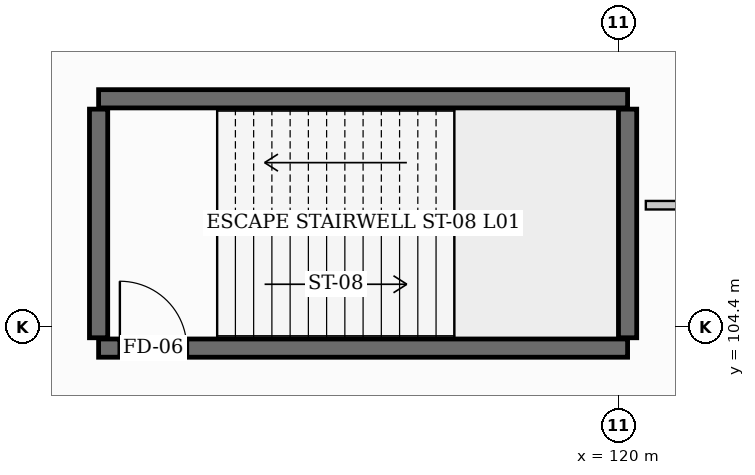
"""IFC4 building model, lengths in metres.
Left out: names, types, materials, properties, quantities, classifications, styles, units other than length and angle.
Written with IfcOpenShell. Run it as: python <this file> out.ifc"""

import sys

from ifc_helpers import new_model, si_unit, direction, frame, frame_2d, origin, place, context, subcontext, project, spatial, rectangle, extrude, element, fill, save


model = new_model("IFC4")
c1 = context("Model", 3, precision=1e-05, world=origin(), true_north=direction((0.0, 1.0)))
c2 = subcontext(c1, "Body", "Model", "MODEL_VIEW")
j1 = project(units=[si_unit("LENGTHUNIT", "METRE"), si_unit("PLANEANGLEUNIT", "RADIAN")], contexts=[c1])
p1 = place(None, origin())
s1 = spatial("IfcSite", under=j1, at=p1, CompositionType="ELEMENT")
p2 = place(p1, origin())
s2 = spatial("IfcBuilding", under=s1, at=p2, CompositionType="ELEMENT")
p3 = place(p2, frame((0.0, 0.0, 4.8)))
s3 = spatial("IfcBuildingStorey", under=s2, at=p3, CompositionType="ELEMENT", Elevation=4.8)
p4 = place(p3, frame((111.45, 104.05, 0.0), z_axis=(0.0, 0.0, 1.0), x_axis=(1.0, 0.0, 0.0)))
e1 = element("IfcWall", 1, at=p4, inside=s3, PredefinedType="SHEAR", context=c2, shape_type="SweptSolid", body=[
    extrude(rectangle(XDim=8.7, YDim=0.3, at=frame_2d((4.35, 0.0))), origin(), (0.0, 0.0, 1.0), 4.8),
])
p5 = place(p4, frame((0.35, 0.0, 0.0)))
e2 = element("IfcOpeningElement", 2, at=p5, cuts=e1, PredefinedType="OPENING", context=c2, shape_type="SweptSolid", body=[
    extrude(rectangle(XDim=1.1, YDim=2.15, at=frame_2d((0.55, 1.075))), frame((0.0, 0.16, 0.0), z_axis=(0.0, -1.0, 0.0), x_axis=(1.0, 0.0, 0.0)), (0.0, 0.0, 1.0), 0.32),
])
p6 = place(p3, frame((120.15, 108.15, 0.0), z_axis=(0.0, 0.0, 1.0), x_axis=(-1.0, 0.0, 0.0)))
e3 = element("IfcWall", 3, at=p6, inside=s3, PredefinedType="SHEAR", context=c2, shape_type="SweptSolid", body=[
    extrude(rectangle(XDim=8.7, YDim=0.3, at=frame_2d((4.35, 0.0))), origin(), (0.0, 0.0, 1.0), 4.8),
])
for number, where, z_axis, x_axis in (
    (4, (111.45, 104.22, 0.0), (0.0, 0.0, 1.0), (0.0, 1.0, 0.0)),
    (5, (120.15, 104.22, 0.0), (0.0, 0.0, 1.0), (0.0, 1.0, 0.0)),
):
    element("IfcWall", number, at=place(p3, frame(where, z_axis=z_axis, x_axis=x_axis)), inside=s3, PredefinedType="SHEAR", context=c2, shape_type="SweptSolid", body=[
        extrude(rectangle(XDim=3.76, YDim=0.3, at=frame_2d((1.88, 0.0))), origin(), (0.0, 0.0, 1.0), 4.8),
    ])
p7 = place(p3, frame((120.45, 106.4, 0.0), z_axis=(0.0, 0.0, 1.0), x_axis=(1.0, 0.0, 0.0)))
e6 = element("IfcWall", 6, at=p7, inside=s3, PredefinedType="PARTITIONING", context=c2, shape_type="SweptSolid", body=[
    extrude(rectangle(XDim=11.25, YDim=0.14, at=frame_2d((5.625, 0.0))), origin(), (0.0, 0.0, 1.0), 3.976),
])
p8 = place(p7, frame((4.975, 0.0, 0.0)))
e7 = element("IfcOpeningElement", 7, at=p8, cuts=e6, PredefinedType="OPENING", context=c2, shape_type="SweptSolid", body=[
    extrude(rectangle(XDim=1.2, YDim=2.12, at=frame_2d((0.6, 1.06))), frame((0.0, 0.08, 0.0), z_axis=(0.0, -1.0, 0.0), x_axis=(1.0, 0.0, 0.0)), (0.0, 0.0, 1.0), 0.16),
])
p9 = place(p5, origin())
e8 = element("IfcDoor", 8, at=p9, inside=s3, OperationType="SINGLE_SWING_LEFT", PredefinedType="DOOR", context=c2, shape_type="SweptSolid", body=[
    extrude(rectangle(XDim=1.1, YDim=2.15, at=frame_2d((0.55, 1.075))), frame((0.0, 0.025, 0.0), z_axis=(0.0, -1.0, 0.0), x_axis=(1.0, 0.0, 0.0)), (0.0, 0.0, 1.0), 0.05),
])
fill(e2, e8)
save(model, sys.argv[1])
